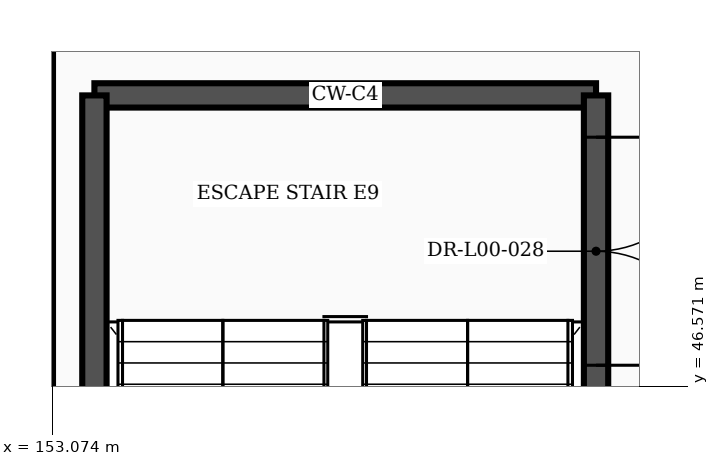
"""IFC4 building model, lengths in metres.
Left out: names, types, materials, properties, quantities, classifications, styles, units other than length and angle.
Written with IfcOpenShell. Run it as: python <this file> out.ifc"""

import sys

from ifc_helpers import new_model, si_unit, direction, frame, frame_2d, origin, place, context, subcontext, project, spatial, rectangle, extrude, element, fill, save


model = new_model("IFC4")
c1 = context("Model", 3, precision=1e-05, world=origin(), true_north=direction((0.0, 1.0)))
c2 = subcontext(c1, "Body", "Model", "MODEL_VIEW")
j1 = project(units=[si_unit("LENGTHUNIT", "METRE"), si_unit("PLANEANGLEUNIT", "RADIAN")], contexts=[c1])
p1 = place(None, origin())
s1 = spatial("IfcSite", under=j1, at=p1, CompositionType="ELEMENT")
p2 = place(p1, origin())
s2 = spatial("IfcBuilding", under=s1, at=p2, CompositionType="ELEMENT")
p3 = place(p2, origin())
s3 = spatial("IfcBuildingStorey", under=s2, at=p3, CompositionType="ELEMENT", Elevation=0.0)
p4 = place(p3, frame((153.63, 50.4, 0.0), z_axis=(0.0, 0.0, 1.0), x_axis=(1.0, 0.0, 0.0)))
e1 = element("IfcWall", 1, at=p4, inside=s3, PredefinedType="SHEAR", context=c2, shape_type="SweptSolid", body=[
    extrude(rectangle(XDim=6.6, YDim=0.32, at=frame_2d((3.3, 0.0))), origin(), (0.0, 0.0, 1.0), 5.75),
])
p5 = place(p3, frame((153.63, 39.2, 0.0), z_axis=(0.0, 0.0, 1.0), x_axis=(0.0, 1.0, 0.0)))
e2 = element("IfcWall", 2, at=p5, inside=s3, PredefinedType="SHEAR", context=c2, shape_type="SweptSolid", body=[
    extrude(rectangle(XDim=11.2, YDim=0.32, at=frame_2d((5.6, 0.0))), origin(), (0.0, 0.0, 1.0), 5.75),
])
p6 = place(p3, frame((160.23, 39.2, 0.0), z_axis=(0.0, 0.0, 1.0), x_axis=(0.0, 1.0, 0.0)))
e3 = element("IfcWall", 3, at=p6, inside=s3, PredefinedType="SHEAR", context=c2, shape_type="SweptSolid", body=[
    extrude(rectangle(XDim=11.2, YDim=0.32, at=frame_2d((5.6, 0.0))), origin(), (0.0, 0.0, 1.0), 5.75),
])
p7 = place(p6, frame((7.65, 0.0, 0.0)))
e4 = element("IfcOpeningElement", 4, at=p7, cuts=e3, PredefinedType="OPENING", context=c2, shape_type="SweptSolid", body=[
    extrude(rectangle(XDim=3.0, YDim=2.25, at=frame_2d((1.5, 1.125))), frame((0.0, 0.172, 0.0), z_axis=(0.0, -1.0, 0.0), x_axis=(1.0, 0.0, 0.0)), (0.0, 0.0, 1.0), 0.344),
])
p8 = place(p3, frame((153.0, 36.22, 0.0), z_axis=(0.0, 0.0, 1.0), x_axis=(0.0, 1.0, 0.0)))
e5 = element("IfcWall", 5, at=p8, inside=s3, PredefinedType="PARTITIONING", context=c2, shape_type="SweptSolid", body=[
    extrude(rectangle(XDim=23.56, YDim=0.17, at=frame_2d((11.78, 0.0))), origin(), (0.0, 0.0, 1.0), 5.066),
])
p9 = place(p8, frame((14.78, 0.0, 0.0)))
e6 = element("IfcOpeningElement", 6, at=p9, cuts=e5, PredefinedType="OPENING", context=c2, shape_type="SweptSolid", body=[
    extrude(rectangle(XDim=2.4, YDim=2.35, at=frame_2d((1.2, 1.175))), frame((0.0, 0.097, 0.0), z_axis=(0.0, -1.0, 0.0), x_axis=(1.0, 0.0, 0.0)), (0.0, 0.0, 1.0), 0.194),
])
p10 = place(p8, frame((17.58, 0.0, 0.0)))
e7 = element("IfcOpeningElement", 7, at=p10, cuts=e5, PredefinedType="OPENING", context=c2, shape_type="SweptSolid", body=[
    extrude(rectangle(XDim=2.4, YDim=2.35, at=frame_2d((1.2, 1.175))), frame((0.0, 0.097, 0.0), z_axis=(0.0, -1.0, 0.0), x_axis=(1.0, 0.0, 0.0)), (0.0, 0.0, 1.0), 0.194),
])
p11 = place(p8, frame((20.38, 0.0, 0.0)))
e8 = element("IfcOpeningElement", 8, at=p11, cuts=e5, PredefinedType="OPENING", context=c2, shape_type="SweptSolid", body=[
    extrude(rectangle(XDim=2.4, YDim=2.35, at=frame_2d((1.2, 1.175))), frame((0.0, 0.097, 0.0), z_axis=(0.0, -1.0, 0.0), x_axis=(1.0, 0.0, 0.0)), (0.0, 0.0, 1.0), 0.194),
])
p12 = place(p7, frame((3.0, 0.0, 0.0), z_axis=(0.0, 0.0, 1.0), x_axis=(-1.0, 0.0, 0.0)))
e9 = element("IfcDoor", 9, at=p12, inside=s3, OperationType="DOUBLE_DOOR_SINGLE_SWING", PredefinedType="DOOR", context=c2, shape_type="SweptSolid", body=[
    extrude(rectangle(XDim=3.0, YDim=2.25, at=frame_2d((1.5, 1.125))), frame((0.0, 0.025, 0.0), z_axis=(0.0, -1.0, 0.0), x_axis=(1.0, 0.0, 0.0)), (0.0, 0.0, 1.0), 0.05),
])
fill(e4, e9)
save(model, sys.argv[1])
